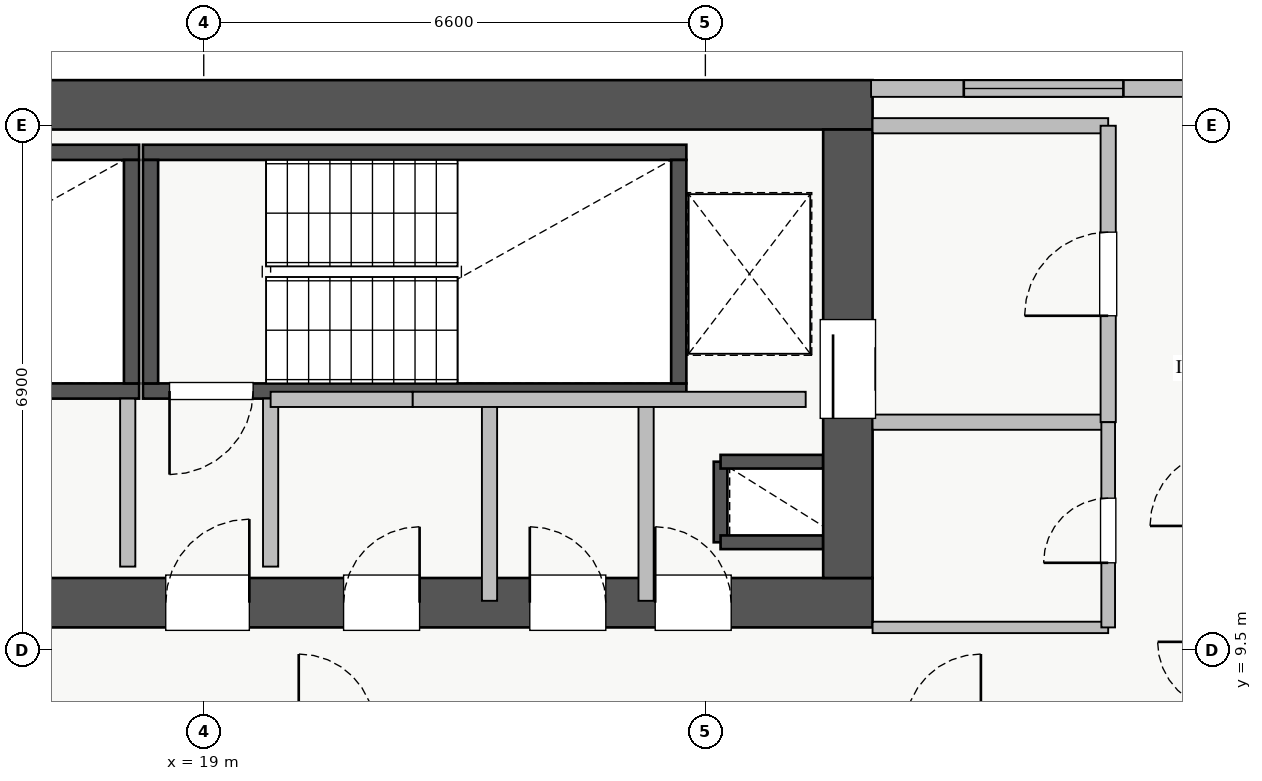
"""IFC4 building model, lengths in metres.
Left out: names, types, materials, properties, quantities, classifications, styles, units other than length and angle.
Written with IfcOpenShell. Run it as: python <this file> out.ifc"""

import sys

from ifc_helpers import new_model, si_unit, direction, frame, frame_2d, origin, place, context, subcontext, project, spatial, rectangle, extrude, source, transform, mapped, element, fill, save


model = new_model("IFC4")
c1 = context("Model", 3, precision=1e-05, world=origin(), true_north=direction((0.0, 1.0)))
c2 = subcontext(c1, "Body", "Model", "MODEL_VIEW")
j1 = project(units=[si_unit("LENGTHUNIT", "METRE"), si_unit("PLANEANGLEUNIT", "RADIAN")], contexts=[c1])
p1 = place(None, origin())
s1 = spatial("IfcSite", under=j1, at=p1, CompositionType="ELEMENT")
p2 = place(p1, origin())
s2 = spatial("IfcBuilding", under=s1, at=p2, CompositionType="ELEMENT")
p3 = place(p2, frame((0.0, 0.0, 160.0)))
s3 = spatial("IfcBuildingStorey", under=s2, at=p3, CompositionType="ELEMENT", Elevation=160.0)
p4 = place(p3, frame((25.8, 10.92, 0.0), z_axis=(0.0, 0.0, 1.0), x_axis=(0.0, 1.0, 0.0)))
e1 = element("IfcWall", 1, at=p4, inside=s3, PredefinedType="SHEAR", context=c2, shape_type="SweptSolid", body=[
    extrude(rectangle(XDim=1.06, YDim=0.18, at=frame_2d((0.53, 0.0))), origin(), (0.0, 0.0, 1.0), 3.07),
])
for number, where, z_axis, x_axis in (
    (2, (25.8, 11.98, 0.0), (0.0, 0.0, 1.0), (1.0, 0.0, 0.0)),
    (3, (25.8, 10.92, 0.0), (0.0, 0.0, 1.0), (1.0, 0.0, 0.0)),
):
    element("IfcWall", number, at=place(p3, frame(where, z_axis=z_axis, x_axis=x_axis)), inside=s3, PredefinedType="SHEAR", context=c2, shape_type="SweptSolid", body=[
        extrude(rectangle(XDim=1.35, YDim=0.18, at=frame_2d((0.675, 0.0))), origin(), (0.0, 0.0, 1.0), 3.07),
    ])
p5 = place(p3, frame((10.85, 12.91, 0.0), z_axis=(0.0, 0.0, 1.0), x_axis=(1.0, 0.0, 0.0)))
e4 = element("IfcWall", 4, at=p5, inside=s3, PredefinedType="SHEAR", context=c2, shape_type="SweptSolid", body=[
    extrude(rectangle(XDim=7.3, YDim=0.2, at=frame_2d((3.65, 0.0))), origin(), (0.0, 0.0, 1.0), 3.25),
])
p6 = place(p5, frame((0.35, 0.0, 0.0)))
e5 = element("IfcOpeningElement", 5, at=p6, cuts=e4, PredefinedType="OPENING", context=c2, shape_type="SweptSolid", body=[
    extrude(rectangle(XDim=1.1, YDim=2.05, at=frame_2d((0.55, 1.025))), frame((0.0, 0.11, 0.0), z_axis=(0.0, -1.0, 0.0), x_axis=(1.0, 0.0, 0.0)), (0.0, 0.0, 1.0), 0.22),
])
p7 = place(p3, frame((10.85, 16.05, 0.0), z_axis=(0.0, 0.0, 1.0), x_axis=(1.0, 0.0, 0.0)))
e6 = element("IfcWall", 6, at=p7, inside=s3, PredefinedType="SHEAR", context=c2, shape_type="SweptSolid", body=[
    extrude(rectangle(XDim=7.3, YDim=0.2, at=frame_2d((3.65, 0.0))), origin(), (0.0, 0.0, 1.0), 3.25),
])
p8 = place(p3, frame((18.05, 13.01, 0.0), z_axis=(0.0, 0.0, 1.0), x_axis=(0.0, 1.0, 0.0)))
e7 = element("IfcWall", 7, at=p8, inside=s3, PredefinedType="SHEAR", context=c2, shape_type="SweptSolid", body=[
    extrude(rectangle(XDim=2.94, YDim=0.2, at=frame_2d((1.47, 0.0))), origin(), (0.0, 0.0, 1.0), 3.25),
])
p9 = place(p3, frame((18.2, 12.91, 0.0), z_axis=(0.0, 0.0, 1.0), x_axis=(1.0, 0.0, 0.0)))
e8 = element("IfcWall", 8, at=p9, inside=s3, PredefinedType="SHEAR", context=c2, shape_type="SweptSolid", body=[
    extrude(rectangle(XDim=7.15, YDim=0.2, at=frame_2d((3.575, 0.0))), origin(), (0.0, 0.0, 1.0), 3.25),
])
p10 = place(p9, frame((0.35, 0.0, 0.0)))
e9 = element("IfcOpeningElement", 9, at=p10, cuts=e8, PredefinedType="OPENING", context=c2, shape_type="SweptSolid", body=[
    extrude(rectangle(XDim=1.1, YDim=2.05, at=frame_2d((0.55, 1.025))), frame((0.0, 0.11, 0.0), z_axis=(0.0, -1.0, 0.0), x_axis=(1.0, 0.0, 0.0)), (0.0, 0.0, 1.0), 0.22),
])
p11 = place(p3, frame((18.2, 16.05, 0.0), z_axis=(0.0, 0.0, 1.0), x_axis=(1.0, 0.0, 0.0)))
e10 = element("IfcWall", 10, at=p11, inside=s3, PredefinedType="SHEAR", context=c2, shape_type="SweptSolid", body=[
    extrude(rectangle(XDim=7.15, YDim=0.2, at=frame_2d((3.575, 0.0))), origin(), (0.0, 0.0, 1.0), 3.25),
])
for number, where, z_axis, x_axis in (
    (11, (18.3, 13.01, 0.0), (0.0, 0.0, 1.0), (0.0, 1.0, 0.0)),
    (12, (25.25, 13.01, 0.0), (0.0, 0.0, 1.0), (0.0, 1.0, 0.0)),
):
    element("IfcWall", number, at=place(p3, frame(where, z_axis=z_axis, x_axis=x_axis)), inside=s3, PredefinedType="SHEAR", context=c2, shape_type="SweptSolid", body=[
        extrude(rectangle(XDim=2.94, YDim=0.2, at=frame_2d((1.47, 0.0))), origin(), (0.0, 0.0, 1.0), 3.25),
    ])
p12 = place(p3, frame((10.2, 10.125, 0.0), z_axis=(0.0, 0.0, 1.0), x_axis=(1.0, 0.0, 0.0)))
e13 = element("IfcWall", 13, at=p12, inside=s3, PredefinedType="SHEAR", context=c2, shape_type="SweptSolid", body=[
    extrude(rectangle(XDim=17.6, YDim=0.65, at=frame_2d((8.8, 0.0))), origin(), (0.0, 0.0, 1.0), 3.25),
])
p13 = place(p12, frame((1.15, 0.0, 0.0)))
e14 = element("IfcOpeningElement", 14, at=p13, cuts=e13, PredefinedType="OPENING", context=c2, shape_type="SweptSolid", body=[
    extrude(rectangle(XDim=1.1, YDim=2.05, at=frame_2d((0.55, 1.025))), frame((0.0, 0.335, 0.0), z_axis=(0.0, -1.0, 0.0), x_axis=(1.0, 0.0, 0.0)), (0.0, 0.0, 1.0), 0.67),
])
p14 = place(p12, frame((8.3, 0.0, 0.0)))
e15 = element("IfcOpeningElement", 15, at=p14, cuts=e13, PredefinedType="OPENING", context=c2, shape_type="SweptSolid", body=[
    extrude(rectangle(XDim=1.1, YDim=2.05, at=frame_2d((0.55, 1.025))), frame((0.0, 0.335, 0.0), z_axis=(0.0, -1.0, 0.0), x_axis=(1.0, 0.0, 0.0)), (0.0, 0.0, 1.0), 0.67),
])
p15 = place(p12, frame((4.9, 0.0, 0.0)))
e16 = element("IfcOpeningElement", 16, at=p15, cuts=e13, PredefinedType="OPENING", context=c2, shape_type="SweptSolid", body=[
    extrude(rectangle(XDim=1.1, YDim=2.05, at=frame_2d((0.55, 1.025))), frame((0.0, 0.335, 0.0), z_axis=(0.0, -1.0, 0.0), x_axis=(1.0, 0.0, 0.0)), (0.0, 0.0, 1.0), 0.67),
])
p16 = place(p12, frame((14.74, 0.0, 0.0)))
e17 = element("IfcOpeningElement", 17, at=p16, cuts=e13, PredefinedType="OPENING", context=c2, shape_type="SweptSolid", body=[
    extrude(rectangle(XDim=1.0, YDim=2.05, at=frame_2d((0.5, 1.025))), frame((0.0, 0.335, 0.0), z_axis=(0.0, -1.0, 0.0), x_axis=(1.0, 0.0, 0.0)), (0.0, 0.0, 1.0), 0.67),
])
p17 = place(p12, frame((10.64, 0.0, 0.0)))
e18 = element("IfcOpeningElement", 18, at=p17, cuts=e13, PredefinedType="OPENING", context=c2, shape_type="SweptSolid", body=[
    extrude(rectangle(XDim=1.0, YDim=2.05, at=frame_2d((0.5, 1.025))), frame((0.0, 0.335, 0.0), z_axis=(0.0, -1.0, 0.0), x_axis=(1.0, 0.0, 0.0)), (0.0, 0.0, 1.0), 0.67),
])
p18 = place(p12, frame((13.09, 0.0, 0.0)))
e19 = element("IfcOpeningElement", 19, at=p18, cuts=e13, PredefinedType="OPENING", context=c2, shape_type="SweptSolid", body=[
    extrude(rectangle(XDim=1.0, YDim=2.05, at=frame_2d((0.5, 1.025))), frame((0.0, 0.335, 0.0), z_axis=(0.0, -1.0, 0.0), x_axis=(1.0, 0.0, 0.0)), (0.0, 0.0, 1.0), 0.67),
])
p19 = place(p3, frame((10.2, 16.675, 0.0), z_axis=(0.0, 0.0, 1.0), x_axis=(1.0, 0.0, 0.0)))
e20 = element("IfcWall", 20, at=p19, inside=s3, PredefinedType="SHEAR", context=c2, shape_type="SweptSolid", body=[
    extrude(rectangle(XDim=17.6, YDim=0.65, at=frame_2d((8.8, 0.0))), origin(), (0.0, 0.0, 1.0), 3.25),
])
p20 = place(p3, frame((27.475, 10.45, 0.0), z_axis=(0.0, 0.0, 1.0), x_axis=(0.0, 1.0, 0.0)))
e21 = element("IfcWall", 21, at=p20, inside=s3, PredefinedType="SHEAR", context=c2, shape_type="SweptSolid", body=[
    extrude(rectangle(XDim=5.9, YDim=0.65, at=frame_2d((2.95, 0.0))), origin(), (0.0, 0.0, 1.0), 3.25),
])
p21 = place(p20, frame((2.1, 0.0, 0.0)))
e22 = element("IfcOpeningElement", 22, at=p21, cuts=e21, PredefinedType="OPENING", context=c2, shape_type="SweptSolid", body=[
    extrude(rectangle(XDim=1.3, YDim=2.05, at=frame_2d((0.65, 1.025))), frame((0.0, 0.335, 0.0), z_axis=(0.0, -1.0, 0.0), x_axis=(1.0, 0.0, 0.0)), (0.0, 0.0, 1.0), 0.67),
])
p22 = place(p3, frame((27.78, 16.89, 0.0), z_axis=(0.0, 0.0, 1.0), x_axis=(1.0, 0.0, 0.0)))
e23 = element("IfcWall", 23, at=p22, inside=s3, PredefinedType="STANDARD", context=c2, shape_type="SweptSolid", body=[
    extrude(rectangle(XDim=8.87, YDim=0.22, at=frame_2d((4.435, 0.0))), origin(), (0.0, 0.0, 1.0), 2.61),
])
p23 = place(p22, frame((1.22, 0.0, 0.9)))
e24 = element("IfcOpeningElement", 24, at=p23, cuts=e23, PredefinedType="OPENING", context=c2, shape_type="SweptSolid", body=[
    extrude(rectangle(XDim=2.1, YDim=1.48, at=frame_2d((1.05, 0.74))), frame((0.0, 0.12, 0.0), z_axis=(0.0, -1.0, 0.0), x_axis=(1.0, 0.0, 0.0)), (0.0, 0.0, 1.0), 0.24),
])
p24 = place(p22, frame((6.48, 0.0, 0.9)))
e25 = element("IfcOpeningElement", 25, at=p24, cuts=e23, PredefinedType="OPENING", context=c2, shape_type="SweptSolid", body=[
    extrude(rectangle(XDim=2.1, YDim=1.5, at=frame_2d((1.05, 0.75))), frame((0.0, 0.12, 0.0), z_axis=(0.0, -1.0, 0.0), x_axis=(1.0, 0.0, 0.0)), (0.0, 0.0, 1.0), 0.24),
])
p25 = place(p22, frame((5.01, 0.0, 0.9)))
e26 = element("IfcOpeningElement", 26, at=p25, cuts=e23, PredefinedType="OPENING", context=c2, shape_type="SweptSolid", body=[
    extrude(rectangle(XDim=0.9, YDim=1.2, at=frame_2d((0.45, 0.6))), frame((0.0, 0.12, 0.0), z_axis=(0.0, -1.0, 0.0), x_axis=(1.0, 0.0, 0.0)), (0.0, 0.0, 1.0), 0.24),
])
for number, where, z_axis, x_axis in (
    (27, (27.8, 16.4, 0.0), (0.0, 0.0, 1.0), (1.0, 0.0, 0.0)),
    (28, (27.8, 12.5, 0.0), (0.0, 0.0, 1.0), (1.0, 0.0, 0.0)),
):
    element("IfcWall", number, at=place(p3, frame(where, z_axis=z_axis, x_axis=x_axis)), inside=s3, PredefinedType="PARTITIONING", context=c2, shape_type="SweptSolid", body=[
        extrude(rectangle(XDim=3.1, YDim=0.2, at=frame_2d((1.55, 0.0))), origin(), (0.0, 0.0, 1.0), 3.07),
    ])
p26 = place(p3, frame((30.9, 12.5, 0.0), z_axis=(0.0, 0.0, 1.0), x_axis=(0.0, 1.0, 0.0)))
e29 = element("IfcWall", 29, at=p26, inside=s3, PredefinedType="PARTITIONING", context=c2, shape_type="SweptSolid", body=[
    extrude(rectangle(XDim=3.9, YDim=0.2, at=frame_2d((1.95, 0.0))), origin(), (0.0, 0.0, 1.0), 3.07),
])
p27 = place(p26, frame((1.4, 0.0, 0.0)))
e30 = element("IfcOpeningElement", 30, at=p27, cuts=e29, PredefinedType="OPENING", context=c2, shape_type="SweptSolid", body=[
    extrude(rectangle(XDim=1.1, YDim=2.05, at=frame_2d((0.55, 1.025))), frame((0.0, 0.11, 0.0), z_axis=(0.0, -1.0, 0.0), x_axis=(1.0, 0.0, 0.0)), (0.0, 0.0, 1.0), 0.22),
])
for number, where, z_axis, x_axis in (
    (31, (18.0, 10.6, 0.0), (0.0, 0.0, 1.0), (0.0, 1.0, 0.0)),
    (32, (19.88, 10.6, 0.0), (0.0, 0.0, 1.0), (0.0, 1.0, 0.0)),
):
    element("IfcWall", number, at=place(p3, frame(where, z_axis=z_axis, x_axis=x_axis)), inside=s3, PredefinedType="PARTITIONING", context=c2, shape_type="SweptSolid", body=[
        extrude(rectangle(XDim=2.21, YDim=0.2, at=frame_2d((1.105, 0.0))), origin(), (0.0, 0.0, 1.0), 3.07),
    ])
p28 = place(p3, frame((24.82, 10.15, 0.0), z_axis=(0.0, 0.0, 1.0), x_axis=(0.0, 1.0, 0.0)))
e33 = element("IfcWall", 33, at=p28, inside=s3, PredefinedType="PARTITIONING", context=c2, shape_type="SweptSolid", body=[
    extrude(rectangle(XDim=2.65, YDim=0.2, at=frame_2d((1.325, 0.0))), origin(), (0.0, 0.0, 1.0), 3.07),
])
p29 = place(p3, frame((19.88, 12.8, 0.0), z_axis=(0.0, 0.0, 1.0), x_axis=(1.0, 0.0, 0.0)))
e34 = element("IfcWall", 34, at=p29, inside=s3, PredefinedType="PARTITIONING", context=c2, shape_type="SweptSolid", body=[
    extrude(rectangle(XDim=1.87, YDim=0.2, at=frame_2d((0.935, 0.0))), origin(), (0.0, 0.0, 1.0), 3.07),
])
p30 = place(p3, frame((22.76, 10.15, 0.0), z_axis=(0.0, 0.0, 1.0), x_axis=(0.0, 1.0, 0.0)))
e35 = element("IfcWall", 35, at=p30, inside=s3, PredefinedType="PARTITIONING", context=c2, shape_type="SweptSolid", body=[
    extrude(rectangle(XDim=2.65, YDim=0.2, at=frame_2d((1.325, 0.0))), origin(), (0.0, 0.0, 1.0), 3.07),
])
p31 = place(p3, frame((21.75, 12.8, 0.0), z_axis=(0.0, 0.0, 1.0), x_axis=(1.0, 0.0, 0.0)))
e36 = element("IfcWall", 36, at=p31, inside=s3, PredefinedType="PARTITIONING", context=c2, shape_type="SweptSolid", body=[
    extrude(rectangle(XDim=5.17, YDim=0.2, at=frame_2d((2.585, 0.0))), origin(), (0.0, 0.0, 1.0), 3.07),
])
p32 = place(p3, frame((27.8, 9.8, 0.0), z_axis=(0.0, 0.0, 1.0), x_axis=(1.0, 0.0, 0.0)))
e37 = element("IfcWall", 37, at=p32, inside=s3, PredefinedType="PARTITIONING", context=c2, shape_type="SweptSolid", body=[
    extrude(rectangle(XDim=3.1, YDim=0.15, at=frame_2d((1.55, 0.0))), origin(), (0.0, 0.0, 1.0), 3.07),
])
p33 = place(p3, frame((30.9, 9.8, 0.0), z_axis=(0.0, 0.0, 1.0), x_axis=(0.0, 1.0, 0.0)))
e38 = element("IfcWall", 38, at=p33, inside=s3, PredefinedType="PARTITIONING", context=c2, shape_type="SweptSolid", body=[
    extrude(rectangle(XDim=2.7, YDim=0.18, at=frame_2d((1.35, 0.0))), origin(), (0.0, 0.0, 1.0), 2.565),
])
p34 = place(p33, frame((0.85, 0.0, 0.0)))
e39 = element("IfcOpeningElement", 39, at=p34, cuts=e38, PredefinedType="OPENING", context=c2, shape_type="SweptSolid", body=[
    extrude(rectangle(XDim=0.85, YDim=2.05, at=frame_2d((0.425, 1.025))), frame((0.0, 0.1, 0.0), z_axis=(0.0, -1.0, 0.0), x_axis=(1.0, 0.0, 0.0)), (0.0, 0.0, 1.0), 0.2),
])
m1 = source(origin(), c2, "Body", "SweptSolid", [
    extrude(rectangle(XDim=2.1, YDim=1.48, at=frame_2d((1.05, 0.74))), frame((0.0, 0.03, 0.0), z_axis=(0.0, -1.0, 0.0), x_axis=(1.0, 0.0, 0.0)), (0.0, 0.0, 1.0), 0.06),
])
p35 = place(p23, origin())
e40 = element("IfcWindow", 40, at=p35, inside=s3, PartitioningType="TRIPLE_PANEL_VERTICAL", PredefinedType="WINDOW", context=c2, shape_type="MappedRepresentation", body=[
    mapped(m1, transform((0.0, 0.0, 0.0), x_axis=(1.0, 0.0, 0.0), y_axis=(0.0, 1.0, 0.0), z_axis=(0.0, 0.0, 1.0), scale=1.0)),
])
fill(e24, e40)
m2 = source(origin(), c2, "Body", "SweptSolid", [
    extrude(rectangle(XDim=1.3, YDim=2.05, at=frame_2d((0.65, 1.025))), frame((0.0, 0.025, 0.0), z_axis=(0.0, -1.0, 0.0), x_axis=(1.0, 0.0, 0.0)), (0.0, 0.0, 1.0), 0.05),
])
p36 = place(p21, origin())
e41 = element("IfcDoor", 41, at=p36, inside=s3, OperationType="SLIDING_TO_RIGHT", PredefinedType="DOOR", context=c2, shape_type="MappedRepresentation", body=[
    mapped(m2, transform((0.0, 0.0, 0.0), x_axis=(1.0, 0.0, 0.0), y_axis=(0.0, 1.0, 0.0), z_axis=(0.0, 0.0, 1.0), scale=1.0)),
])
fill(e22, e41)
m3 = source(origin(), c2, "Body", "SweptSolid", [
    extrude(rectangle(XDim=1.1, YDim=2.05, at=frame_2d((0.55, 1.025))), frame((0.0, 0.025, 0.0), z_axis=(0.0, -1.0, 0.0), x_axis=(1.0, 0.0, 0.0)), (0.0, 0.0, 1.0), 0.05),
])
p37 = place(p14, origin())
e42 = element("IfcDoor", 42, at=p37, inside=s3, OperationType="SINGLE_SWING_RIGHT", PredefinedType="DOOR", context=c2, shape_type="MappedRepresentation", body=[
    mapped(m3, transform((0.0, 0.0, 0.0), x_axis=(1.0, 0.0, 0.0), y_axis=(0.0, 1.0, 0.0), z_axis=(0.0, 0.0, 1.0), scale=1.0)),
])
fill(e15, e42)
p38 = place(p10, frame((1.1, 0.0, 0.0), z_axis=(0.0, 0.0, 1.0), x_axis=(-1.0, 0.0, 0.0)))
e43 = element("IfcDoor", 43, at=p38, inside=s3, OperationType="SINGLE_SWING_LEFT", PredefinedType="DOOR", context=c2, shape_type="MappedRepresentation", body=[
    mapped(m3, transform((0.0, 0.0, 0.0), x_axis=(1.0, 0.0, 0.0), y_axis=(0.0, 1.0, 0.0), z_axis=(0.0, 0.0, 1.0), scale=1.0)),
])
fill(e9, e43)
m4 = source(origin(), c2, "Body", "SweptSolid", [
    extrude(rectangle(XDim=1.0, YDim=2.05, at=frame_2d((0.5, 1.025))), frame((0.0, 0.025, 0.0), z_axis=(0.0, -1.0, 0.0), x_axis=(1.0, 0.0, 0.0)), (0.0, 0.0, 1.0), 0.05),
])
p39 = place(p16, origin())
e44 = element("IfcDoor", 44, at=p39, inside=s3, OperationType="SINGLE_SWING_LEFT", PredefinedType="DOOR", context=c2, shape_type="MappedRepresentation", body=[
    mapped(m4, transform((0.0, 0.0, 0.0), x_axis=(1.0, 0.0, 0.0), y_axis=(0.0, 1.0, 0.0), z_axis=(0.0, 0.0, 1.0), scale=1.0)),
])
fill(e17, e44)
p40 = place(p17, origin())
e45 = element("IfcDoor", 45, at=p40, inside=s3, OperationType="SINGLE_SWING_RIGHT", PredefinedType="DOOR", context=c2, shape_type="MappedRepresentation", body=[
    mapped(m4, transform((0.0, 0.0, 0.0), x_axis=(1.0, 0.0, 0.0), y_axis=(0.0, 1.0, 0.0), z_axis=(0.0, 0.0, 1.0), scale=1.0)),
])
fill(e18, e45)
p41 = place(p18, origin())
e46 = element("IfcDoor", 46, at=p41, inside=s3, OperationType="SINGLE_SWING_LEFT", PredefinedType="DOOR", context=c2, shape_type="MappedRepresentation", body=[
    mapped(m4, transform((0.0, 0.0, 0.0), x_axis=(1.0, 0.0, 0.0), y_axis=(0.0, 1.0, 0.0), z_axis=(0.0, 0.0, 1.0), scale=1.0)),
])
fill(e19, e46)
p42 = place(p27, origin())
e47 = element("IfcDoor", 47, at=p42, inside=s3, OperationType="SINGLE_SWING_LEFT", PredefinedType="DOOR", context=c2, shape_type="MappedRepresentation", body=[
    mapped(m3, transform((0.0, 0.0, 0.0), x_axis=(1.0, 0.0, 0.0), y_axis=(0.0, 1.0, 0.0), z_axis=(0.0, 0.0, 1.0), scale=1.0)),
])
fill(e30, e47)
m5 = source(origin(), c2, "Body", "SweptSolid", [
    extrude(rectangle(XDim=0.85, YDim=2.05, at=frame_2d((0.425, 1.025))), frame((0.0, 0.025, 0.0), z_axis=(0.0, -1.0, 0.0), x_axis=(1.0, 0.0, 0.0)), (0.0, 0.0, 1.0), 0.05),
])
p43 = place(p34, origin())
e48 = element("IfcDoor", 48, at=p43, inside=s3, OperationType="SINGLE_SWING_LEFT", PredefinedType="DOOR", context=c2, shape_type="MappedRepresentation", body=[
    mapped(m5, transform((0.0, 0.0, 0.0), x_axis=(1.0, 0.0, 0.0), y_axis=(0.0, 1.0, 0.0), z_axis=(0.0, 0.0, 1.0), scale=1.0)),
])
fill(e39, e48)
save(model, sys.argv[1])
